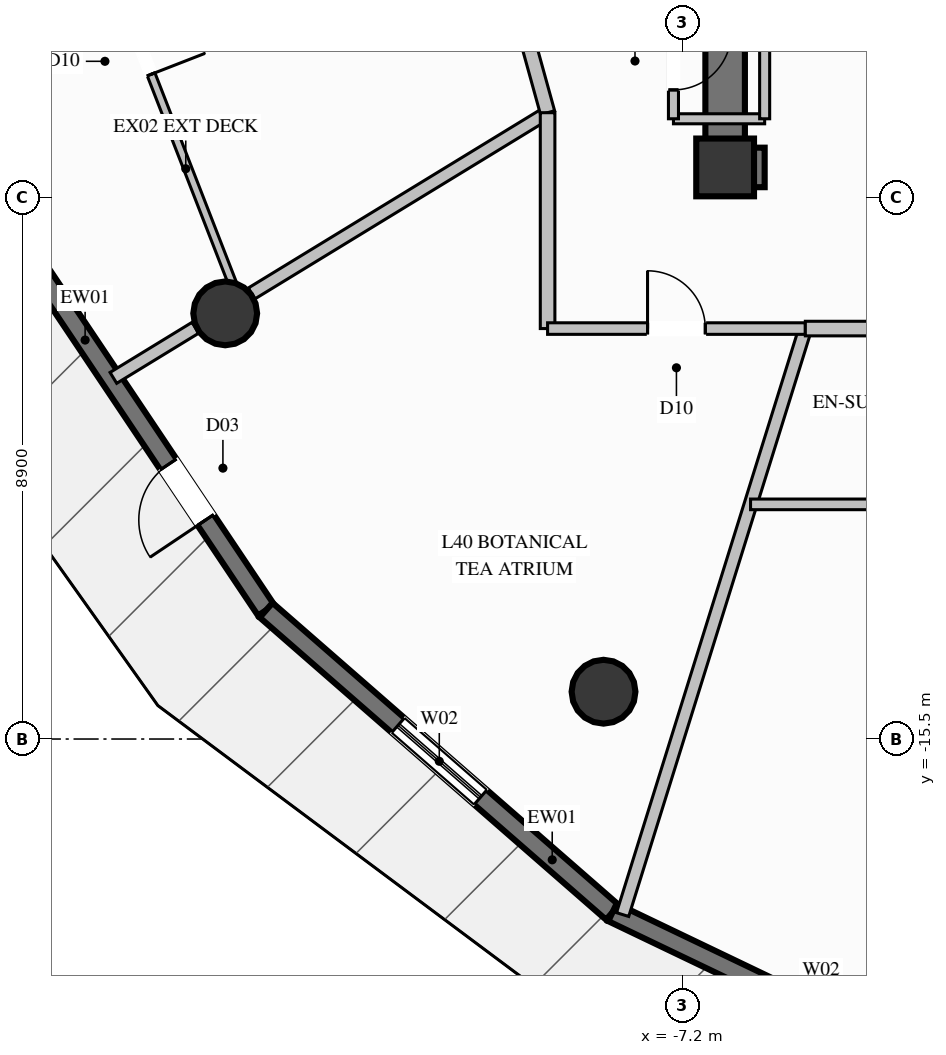
"""IFC4 building model, lengths in metres.
Left out: names, types, materials, properties, quantities, classifications, styles, units other than length and angle.
Written with IfcOpenShell. Run it as: python <this file> out.ifc"""

import sys

from ifc_helpers import new_model, si_unit, direction, frame, frame_2d, origin, origin_2d, place, context, subcontext, project, spatial, rectangle, circle, extrude, element, fill, save


model = new_model("IFC4")
c1 = context("Model", 3, precision=1e-05, world=origin(), true_north=direction((0.0, 1.0)))
c2 = subcontext(c1, "Body", "Model", "MODEL_VIEW")
j1 = project(units=[si_unit("LENGTHUNIT", "METRE"), si_unit("PLANEANGLEUNIT", "RADIAN")], contexts=[c1])
p1 = place(None, origin())
s1 = spatial("IfcSite", under=j1, at=p1, CompositionType="ELEMENT")
p2 = place(p1, origin())
s2 = spatial("IfcBuilding", under=s1, at=p2, CompositionType="ELEMENT")
p3 = place(p2, frame((0.0, 0.0, 156.6)))
s3 = spatial("IfcBuildingStorey", under=s2, at=p3, CompositionType="ELEMENT", Elevation=156.6)
p4 = place(p3, frame((-6.5, -6.1, 0.0), z_axis=(0.0, 0.0, 1.0), x_axis=(1.0, 0.0, 0.0)))
e1 = element("IfcColumn", 1, at=p4, inside=s3, PredefinedType="COLUMN", context=c2, shape_type="SweptSolid", body=[
    extrude(rectangle(XDim=0.95, YDim=0.95, at=origin_2d()), origin(), (0.0, 0.0, 1.0), 3.6),
])
p5 = place(p3, frame((-6.175, -6.1, 0.0), z_axis=(0.0, 0.0, 1.0), x_axis=(1.0, 0.0, 0.0)))
e2 = element("IfcWall", 2, at=p5, inside=s3, PredefinedType="SHEAR", context=c2, shape_type="SweptSolid", body=[
    extrude(rectangle(XDim=0.325, YDim=0.65, at=frame_2d((0.163, 0.0))), origin(), (0.0, 0.0, 1.0), 3.6),
])
p6 = place(p3, frame((-6.5, -6.425, 0.0), z_axis=(0.0, 0.0, 1.0), x_axis=(0.0, 1.0, 0.0)))
e3 = element("IfcWall", 3, at=p6, inside=s3, PredefinedType="SHEAR", context=c2, shape_type="SweptSolid", body=[
    extrude(rectangle(XDim=3.075, YDim=0.65, at=frame_2d((1.538, 0.0))), origin(), (0.0, 0.0, 1.0), 3.6),
])
for number, where, z_axis, x_axis in (
    (4, (-14.722, -8.5, 0.0), (0.0, 0.0, 1.0), (1.0, 0.0, 0.0)),
    (5, (-8.5, -14.722, 0.0), (0.0, 0.0, 1.0), (1.0, 0.0, 0.0)),
):
    element("IfcColumn", number, at=place(p3, frame(where, z_axis=z_axis, x_axis=x_axis)), inside=s3, PredefinedType="COLUMN", context=c2, shape_type="SweptSolid", body=[
        extrude(circle(Radius=0.525, at=origin_2d()), origin(), (0.0, 0.0, 1.0), 3.6),
    ])
p7 = place(p3, frame((-14.049, -13.381, 0.0), z_axis=(0.0, 0.0, 1.0), x_axis=(-0.556711069725, 0.830706196465, 0.0)))
e6 = element("IfcWall", 6, at=p7, inside=s3, PredefinedType="SOLIDWALL", context=c2, shape_type="SweptSolid", body=[
    extrude(rectangle(XDim=7.559, YDim=0.32, at=frame_2d((3.779, 0.0))), origin(), (0.0, 0.0, 1.0), 3.35),
])
p8 = place(p7, frame((1.786, 0.0, 0.0)))
e7 = element("IfcOpeningElement", 7, at=p8, cuts=e6, PredefinedType="OPENING", context=c2, shape_type="SweptSolid", body=[
    extrude(rectangle(XDim=1.1, YDim=2.2, at=frame_2d((0.55, 1.1))), frame((0.0, 0.17, 0.0), z_axis=(0.0, -1.0, 0.0), x_axis=(1.0, 0.0, 0.0)), (0.0, 0.0, 1.0), 0.34),
])
p9 = place(p3, frame((-8.353, -18.351, 0.0), z_axis=(0.0, 0.0, 1.0), x_axis=(-0.753498250632, 0.657449911624, 0.0)))
e8 = element("IfcWall", 8, at=p9, inside=s3, PredefinedType="SOLIDWALL", context=c2, shape_type="SweptSolid", body=[
    extrude(rectangle(XDim=7.56, YDim=0.32, at=frame_2d((3.78, 0.0))), origin(), (0.0, 0.0, 1.0), 3.35),
])
p10 = place(p9, frame((2.88, 0.0, 0.35)))
e9 = element("IfcOpeningElement", 9, at=p10, cuts=e8, PredefinedType="OPENING", context=c2, shape_type="SweptSolid", body=[
    extrude(rectangle(XDim=1.8, YDim=2.6, at=frame_2d((0.9, 1.3))), frame((0.0, 0.17, 0.0), z_axis=(0.0, -1.0, 0.0), x_axis=(1.0, 0.0, 0.0)), (0.0, 0.0, 1.0), 0.34),
])
p11 = place(p3, frame((-1.728, -21.524, 0.0), z_axis=(0.0, 0.0, 1.0), x_axis=(-0.901902357259, 0.431939970332, 0.0)))
e10 = element("IfcWall", 10, at=p11, inside=s3, PredefinedType="SOLIDWALL", context=c2, shape_type="SweptSolid", body=[
    extrude(rectangle(XDim=7.346, YDim=0.32, at=frame_2d((3.673, 0.0))), origin(), (0.0, 0.0, 1.0), 3.35),
])
p12 = place(p11, frame((2.64, 0.0, 0.35)))
e11 = element("IfcOpeningElement", 11, at=p12, cuts=e10, PredefinedType="OPENING", context=c2, shape_type="SweptSolid", body=[
    extrude(rectangle(XDim=1.8, YDim=2.6, at=frame_2d((0.9, 1.3))), frame((0.0, 0.17, 0.0), z_axis=(0.0, -1.0, 0.0), x_axis=(1.0, 0.0, 0.0)), (0.0, 0.0, 1.0), 0.34),
])
p13 = place(p3, frame((-7.35, -5.3, 0.0), z_axis=(0.0, 0.0, 1.0), x_axis=(1.0, 0.0, 0.0)))
e12 = element("IfcWall", 12, at=p13, inside=s3, PredefinedType="PARTITIONING", context=c2, shape_type="SweptSolid", body=[
    extrude(rectangle(XDim=1.5, YDim=0.165, at=frame_2d((0.75, 0.0))), origin(), (0.0, 0.0, 1.0), 2.435),
])
p14 = place(p3, frame((-5.85, -5.3, 0.0), z_axis=(0.0, 0.0, 1.0), x_axis=(0.0, 1.0, 0.0)))
e13 = element("IfcWall", 13, at=p14, inside=s3, PredefinedType="PARTITIONING", context=c2, shape_type="SweptSolid", body=[
    extrude(rectangle(XDim=1.9, YDim=0.165, at=frame_2d((0.95, 0.0))), origin(), (0.0, 0.0, 1.0), 2.435),
])
p15 = place(p3, frame((-7.35, -3.4, 0.0), z_axis=(0.0, 0.0, 1.0), x_axis=(0.0, -1.0, 0.0)))
e14 = element("IfcWall", 14, at=p15, inside=s3, PredefinedType="PARTITIONING", context=c2, shape_type="SweptSolid", body=[
    extrude(rectangle(XDim=1.9, YDim=0.165, at=frame_2d((0.95, 0.0))), origin(), (0.0, 0.0, 1.0), 3.35),
])
p16 = place(p15, frame((0.475, 0.0, 0.0)))
e15 = element("IfcOpeningElement", 15, at=p16, cuts=e14, PredefinedType="OPENING", context=c2, shape_type="SweptSolid", body=[
    extrude(rectangle(XDim=0.95, YDim=2.1, at=frame_2d((0.475, 1.05))), frame((0.0, 0.093, 0.0), z_axis=(0.0, -1.0, 0.0), x_axis=(1.0, 0.0, 0.0)), (0.0, 0.0, 1.0), 0.185),
])
p17 = place(p3, frame((-9.42, -5.2, 0.0), z_axis=(0.0, 0.0, 1.0), x_axis=(-0.853455334267, -0.521165993146, 0.0)))
e16 = element("IfcWall", 16, at=p17, inside=s3, PredefinedType="PARTITIONING", context=c2, shape_type="SweptSolid", body=[
    extrude(rectangle(XDim=5.703, YDim=0.21, at=frame_2d((2.852, 0.0))), origin(), (0.0, 0.0, 1.0), 2.717),
])
p18 = place(p3, frame((-15.213, -8.737, 0.0), z_axis=(0.0, 0.0, 1.0), x_axis=(-0.853251275715, -0.521500010058, 0.0)))
e17 = element("IfcWall", 17, at=p18, inside=s3, PredefinedType="PARTITIONING", context=c2, shape_type="SweptSolid", body=[
    extrude(rectangle(XDim=1.58, YDim=0.21, at=frame_2d((0.79, 0.0))), origin(), (0.0, 0.0, 1.0), 3.35),
])
p19 = place(p3, frame((-10.9, 0.15, 0.0), z_axis=(0.0, 0.0, 1.0), x_axis=(0.266625172958, -0.963800299411, 0.0)))
e18 = element("IfcWall", 18, at=p19, inside=s3, PredefinedType="PARTITIONING", context=c2, shape_type="SweptSolid", body=[
    extrude(rectangle(XDim=5.551, YDim=0.24, at=frame_2d((2.775, 0.0))), origin(), (0.0, 0.0, 1.0), 3.35),
])
p20 = place(p3, frame((-17.736, 0.043, 0.0), z_axis=(0.0, 0.0, 1.0), x_axis=(0.362756961883, -0.931883783851, 0.0)))
e19 = element("IfcWall", 19, at=p20, inside=s3, PredefinedType="PARTITIONING", context=c2, shape_type="SweptSolid", body=[
    extrude(rectangle(XDim=8.948, YDim=0.135, at=frame_2d((4.474, 0.0))), origin(), (0.0, 0.0, 1.0), 2.878),
])
p21 = place(p20, frame((3.999, 0.0, 0.0)))
e20 = element("IfcOpeningElement", 20, at=p21, cuts=e19, PredefinedType="OPENING", context=c2, shape_type="SweptSolid", body=[
    extrude(rectangle(XDim=0.95, YDim=2.1, at=frame_2d((0.475, 1.05))), frame((0.0, 0.078, 0.0), z_axis=(0.0, -1.0, 0.0), x_axis=(1.0, 0.0, 0.0)), (0.0, 0.0, 1.0), 0.155),
])
p22 = place(p3, frame((-5.181, -8.75, 0.0), z_axis=(0.0, 0.0, 1.0), x_axis=(-0.297695182725, -0.954660975521, 0.0)))
e21 = element("IfcWall", 21, at=p22, inside=s3, PredefinedType="PARTITIONING", context=c2, shape_type="SweptSolid", body=[
    extrude(rectangle(XDim=10.095, YDim=0.21, at=frame_2d((5.047, 0.0))), origin(), (0.0, 0.0, 1.0), 3.35),
])
p23 = place(p3, frame((-9.42, -5.2, 0.0), z_axis=(0.0, 0.0, 1.0), x_axis=(0.0, -1.0, 0.0)))
e22 = element("IfcWall", 22, at=p23, inside=s3, PredefinedType="PARTITIONING", context=c2, shape_type="SweptSolid", body=[
    extrude(rectangle(XDim=3.55, YDim=0.24, at=frame_2d((1.775, 0.0))), origin(), (0.0, 0.0, 1.0), 3.35),
])
p24 = place(p3, frame((-9.42, -8.75, 0.0), z_axis=(0.0, 0.0, 1.0), x_axis=(1.0, 0.0, 0.0)))
e23 = element("IfcWall", 23, at=p24, inside=s3, PredefinedType="PARTITIONING", context=c2, shape_type="SweptSolid", body=[
    extrude(rectangle(XDim=4.239, YDim=0.19, at=frame_2d((2.12, 0.0))), origin(), (0.0, 0.0, 1.0), 3.35),
])
p25 = place(p24, frame((1.644, 0.0, 0.0)))
e24 = element("IfcOpeningElement", 24, at=p25, cuts=e23, PredefinedType="OPENING", context=c2, shape_type="SweptSolid", body=[
    extrude(rectangle(XDim=0.95, YDim=2.1, at=frame_2d((0.475, 1.05))), frame((0.0, 0.105, 0.0), z_axis=(0.0, -1.0, 0.0), x_axis=(1.0, 0.0, 0.0)), (0.0, 0.0, 1.0), 0.21),
])
p26 = place(p3, frame((-5.181, -8.75, 0.0), z_axis=(0.0, 0.0, 1.0), x_axis=(1.0, 0.0, 0.0)))
e25 = element("IfcWall", 25, at=p26, inside=s3, PredefinedType="PARTITIONING", context=c2, shape_type="SweptSolid", body=[
    extrude(rectangle(XDim=5.181, YDim=0.24, at=frame_2d((2.59, 0.0))), origin(), (0.0, 0.0, 1.0), 3.35),
])
p27 = place(p3, frame((-6.082, -11.641, 0.0), z_axis=(0.0, 0.0, 1.0), x_axis=(1.0, 0.0, 0.0)))
e26 = element("IfcWall", 26, at=p27, inside=s3, PredefinedType="PLUMBINGWALL", context=c2, shape_type="SweptSolid", body=[
    extrude(rectangle(XDim=6.082, YDim=0.175, at=frame_2d((3.041, 0.0))), origin(), (0.0, 0.0, 1.0), 3.35),
])
p28 = place(p8, origin())
e27 = element("IfcDoor", 27, at=p28, inside=s3, OperationType="SINGLE_SWING_LEFT", PredefinedType="DOOR", context=c2, shape_type="SweptSolid", body=[
    extrude(rectangle(XDim=1.1, YDim=2.2, at=frame_2d((0.55, 1.1))), frame((0.0, 0.025, 0.0), z_axis=(0.0, -1.0, 0.0), x_axis=(1.0, 0.0, 0.0)), (0.0, 0.0, 1.0), 0.05),
])
fill(e7, e27)
p29 = place(p10, origin())
e28 = element("IfcWindow", 28, at=p29, inside=s3, PartitioningType="SINGLE_PANEL", PredefinedType="WINDOW", context=c2, shape_type="SweptSolid", body=[
    extrude(rectangle(XDim=1.8, YDim=2.6, at=frame_2d((0.9, 1.3))), frame((0.0, 0.03, 0.0), z_axis=(0.0, -1.0, 0.0), x_axis=(1.0, 0.0, 0.0)), (0.0, 0.0, 1.0), 0.06),
])
fill(e9, e28)
p30 = place(p16, origin())
e29 = element("IfcDoor", 29, at=p30, inside=s3, OperationType="SINGLE_SWING_LEFT", PredefinedType="DOOR", context=c2, shape_type="SweptSolid", body=[
    extrude(rectangle(XDim=0.95, YDim=2.1, at=frame_2d((0.475, 1.05))), frame((0.0, 0.025, 0.0), z_axis=(0.0, -1.0, 0.0), x_axis=(1.0, 0.0, 0.0)), (0.0, 0.0, 1.0), 0.05),
])
fill(e15, e29)
p31 = place(p21, origin())
e30 = element("IfcDoor", 30, at=p31, inside=s3, OperationType="SINGLE_SWING_RIGHT", PredefinedType="DOOR", context=c2, shape_type="SweptSolid", body=[
    extrude(rectangle(XDim=0.95, YDim=2.1, at=frame_2d((0.475, 1.05))), frame((0.0, 0.025, 0.0), z_axis=(0.0, -1.0, 0.0), x_axis=(1.0, 0.0, 0.0)), (0.0, 0.0, 1.0), 0.05),
])
fill(e20, e30)
p32 = place(p25, origin())
e31 = element("IfcDoor", 31, at=p32, inside=s3, OperationType="SINGLE_SWING_LEFT", PredefinedType="DOOR", context=c2, shape_type="SweptSolid", body=[
    extrude(rectangle(XDim=0.95, YDim=2.1, at=frame_2d((0.475, 1.05))), frame((0.0, 0.025, 0.0), z_axis=(0.0, -1.0, 0.0), x_axis=(1.0, 0.0, 0.0)), (0.0, 0.0, 1.0), 0.05),
])
fill(e24, e31)
save(model, sys.argv[1])
